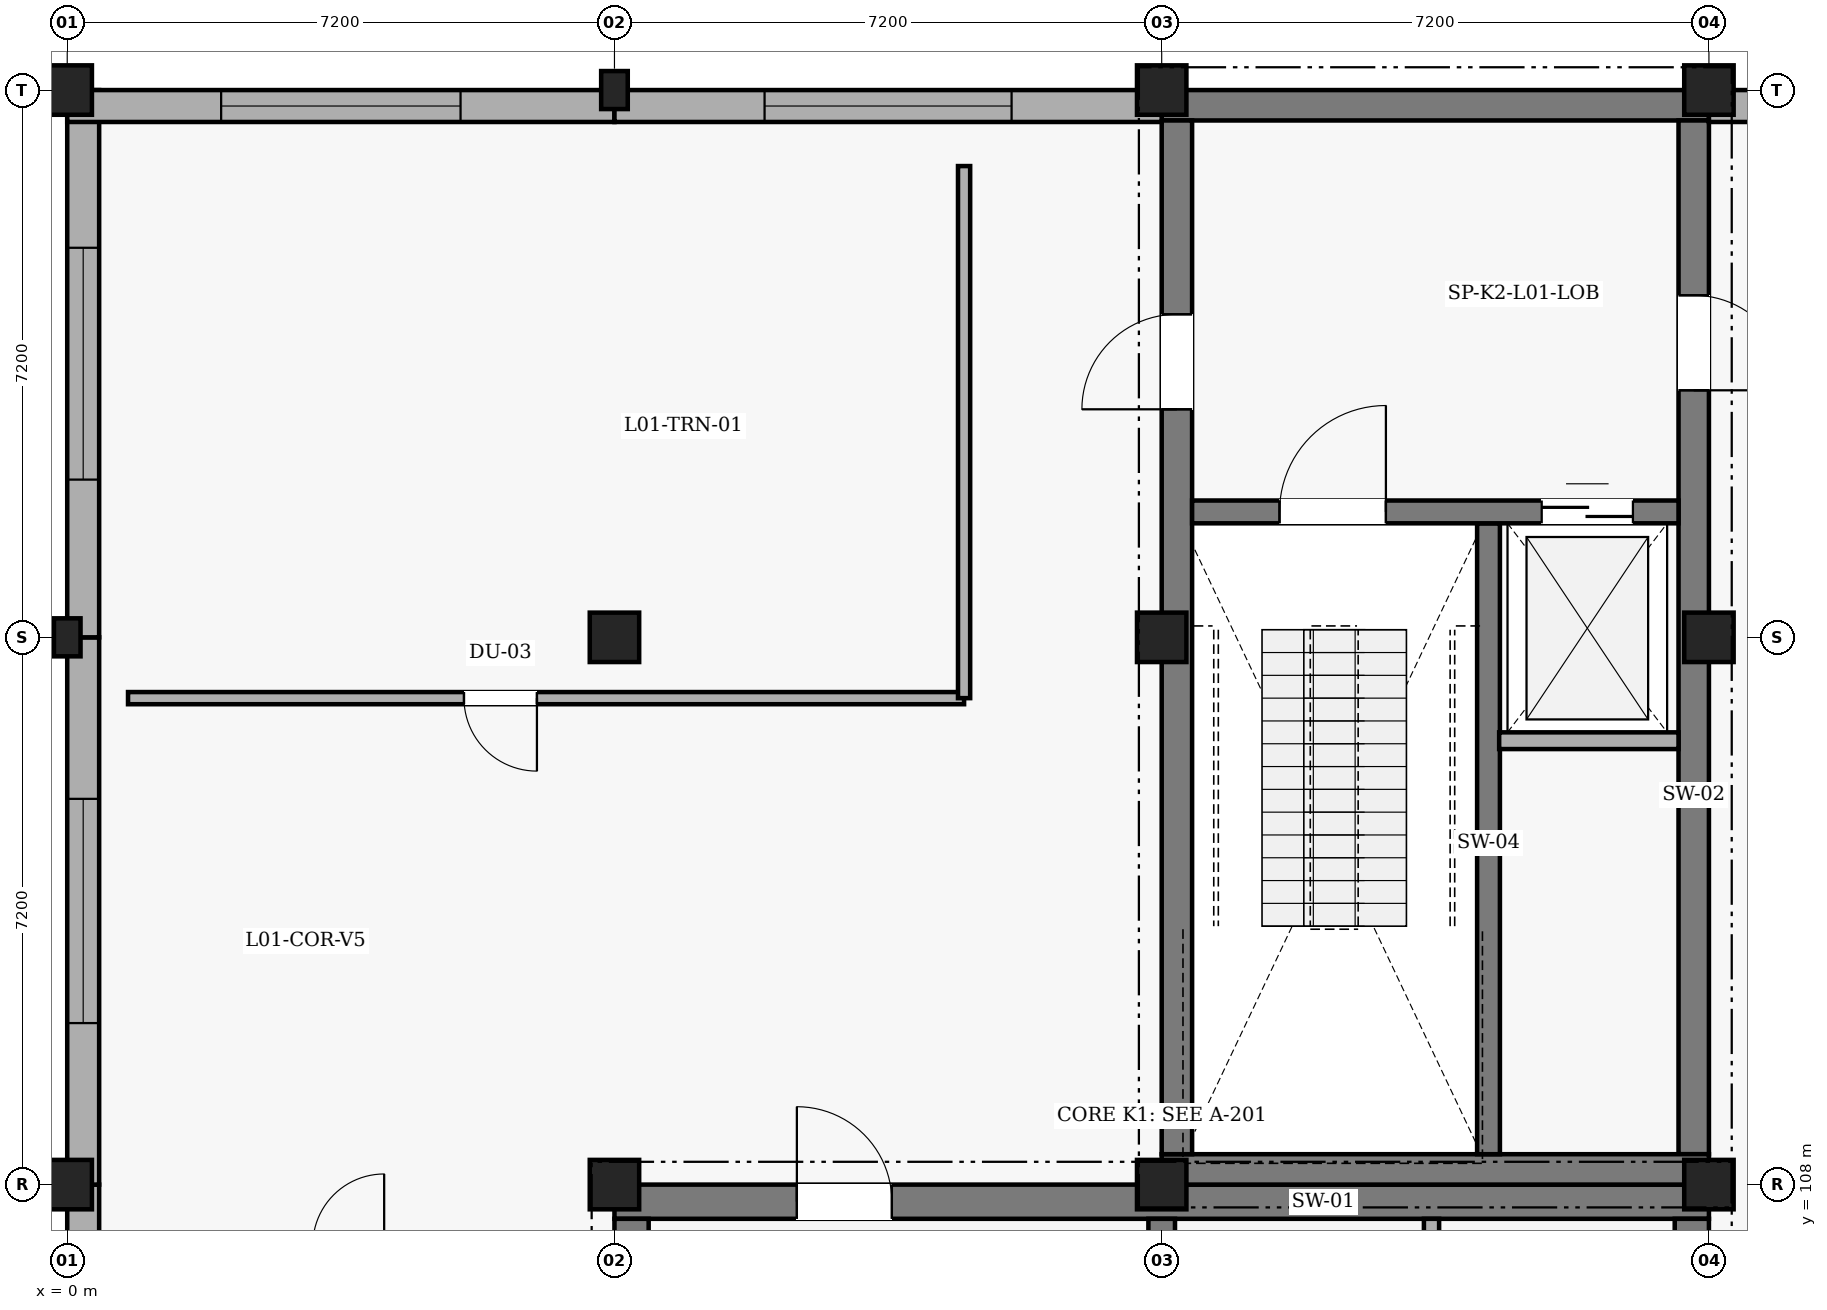
"""IFC4 building model, lengths in metres.
Left out: names, types, materials, properties, quantities, classifications, styles, units other than length and angle.
Written with IfcOpenShell. Run it as: python <this file> out.ifc"""

import sys

from ifc_helpers import new_model, si_unit, direction, frame, frame_2d, origin, origin_2d, place, context, subcontext, project, spatial, rectangle, extrude, element, fill, save


model = new_model("IFC4")
c1 = context("Model", 3, precision=1e-05, world=origin(), true_north=direction((0.0, 1.0)))
c2 = subcontext(c1, "Body", "Model", "MODEL_VIEW")
j1 = project(units=[si_unit("LENGTHUNIT", "METRE"), si_unit("PLANEANGLEUNIT", "RADIAN")], contexts=[c1])
p1 = place(None, origin())
s1 = spatial("IfcSite", under=j1, at=p1, CompositionType="ELEMENT")
p2 = place(p1, origin())
s2 = spatial("IfcBuilding", under=s1, at=p2, CompositionType="ELEMENT")
p3 = place(p2, frame((0.0, 0.0, 5.4)))
s3 = spatial("IfcBuildingStorey", under=s2, at=p3, CompositionType="ELEMENT", Elevation=5.4)
p4 = place(p3, frame((7.2, 107.775, 0.0), z_axis=(0.0, 0.0, 1.0), x_axis=(1.0, 0.0, 0.0)))
e1 = element("IfcWall", 1, at=p4, inside=s3, PredefinedType="SHEAR", context=c2, shape_type="SweptSolid", body=[
    extrude(rectangle(XDim=14.4, YDim=0.45, at=frame_2d((7.2, 0.0))), origin(), (0.0, 0.0, 1.0), 4.2),
])
p5 = place(p4, frame((2.4, 0.0, 0.0)))
e2 = element("IfcOpeningElement", 2, at=p5, cuts=e1, PredefinedType="OPENING", context=c2, shape_type="SweptSolid", body=[
    extrude(rectangle(XDim=1.25, YDim=2.2, at=frame_2d((0.625, 1.1))), frame((0.0, 0.235, 0.0), z_axis=(0.0, -1.0, 0.0), x_axis=(1.0, 0.0, 0.0)), (0.0, 0.0, 1.0), 0.47),
])
p6 = place(p3, frame((21.375, 107.55, 0.0), z_axis=(0.0, 0.0, 1.0), x_axis=(0.0, -1.0, 0.0)))
e3 = element("IfcWall", 3, at=p6, inside=s3, PredefinedType="SHEAR", context=c2, shape_type="SweptSolid", body=[
    extrude(rectangle(XDim=13.5, YDim=0.45, at=frame_2d((6.75, 0.0))), origin(), (0.0, 0.0, 1.0), 4.2),
])
p7 = place(p6, frame((9.8, 0.0, 0.0)))
e4 = element("IfcOpeningElement", 4, at=p7, cuts=e3, PredefinedType="OPENING", context=c2, shape_type="SweptSolid", body=[
    extrude(rectangle(XDim=1.0, YDim=2.15, at=frame_2d((0.5, 1.075))), frame((0.0, 0.235, 0.0), z_axis=(0.0, -1.0, 0.0), x_axis=(1.0, 0.0, 0.0)), (0.0, 0.0, 1.0), 0.47),
])
p8 = place(p6, frame((2.3, 0.0, 0.0)))
e5 = element("IfcOpeningElement", 5, at=p8, cuts=e3, PredefinedType="OPENING", context=c2, shape_type="SweptSolid", body=[
    extrude(rectangle(XDim=1.25, YDim=2.2, at=frame_2d((0.625, 1.1))), frame((0.0, 0.235, 0.0), z_axis=(0.0, -1.0, 0.0), x_axis=(1.0, 0.0, 0.0)), (0.0, 0.0, 1.0), 0.47),
])
p9 = place(p3, frame((7.425, 94.05, 0.0), z_axis=(0.0, 0.0, 1.0), x_axis=(0.0, 1.0, 0.0)))
e6 = element("IfcWall", 6, at=p9, inside=s3, PredefinedType="SHEAR", context=c2, shape_type="SweptSolid", body=[
    extrude(rectangle(XDim=13.5, YDim=0.45, at=frame_2d((6.75, 0.0))), origin(), (0.0, 0.0, 1.0), 4.2),
])
p10 = place(p3, frame((14.4, 107.55, 0.0), z_axis=(0.0, 0.0, 1.0), x_axis=(0.0, -1.0, 0.0)))
e7 = element("IfcWall", 7, at=p10, inside=s3, PredefinedType="SHEAR", context=c2, shape_type="SweptSolid", body=[
    extrude(rectangle(XDim=13.5, YDim=0.35, at=frame_2d((6.75, 0.0))), origin(), (0.0, 0.0, 1.0), 4.2),
])
p11 = place(p10, frame((1.4, 0.0, 0.0)))
e8 = element("IfcOpeningElement", 8, at=p11, cuts=e7, PredefinedType="OPENING", context=c2, shape_type="SweptSolid", body=[
    extrude(rectangle(XDim=1.25, YDim=2.2, at=frame_2d((0.625, 1.1))), frame((0.0, 0.185, 0.0), z_axis=(0.0, -1.0, 0.0), x_axis=(1.0, 0.0, 0.0)), (0.0, 0.0, 1.0), 0.37),
])
p12 = place(p3, frame((14.4, 122.2, 0.0), z_axis=(0.0, 0.0, 1.0), x_axis=(1.0, 0.0, 0.0)))
e9 = element("IfcWall", 9, at=p12, inside=s3, PredefinedType="SHEAR", context=c2, shape_type="SweptSolid", body=[
    extrude(rectangle(XDim=7.2, YDim=0.4, at=frame_2d((3.6, 0.0))), origin(), (0.0, 0.0, 1.0), 4.2),
])
p13 = place(p3, frame((21.4, 122.0, 0.0), z_axis=(0.0, 0.0, 1.0), x_axis=(0.0, -1.0, 0.0)))
e10 = element("IfcWall", 10, at=p13, inside=s3, PredefinedType="SHEAR", context=c2, shape_type="SweptSolid", body=[
    extrude(rectangle(XDim=13.6, YDim=0.4, at=frame_2d((6.8, 0.0))), origin(), (0.0, 0.0, 1.0), 4.2),
])
p14 = place(p13, frame((2.3, 0.0, 0.0)))
e11 = element("IfcOpeningElement", 11, at=p14, cuts=e10, PredefinedType="OPENING", context=c2, shape_type="SweptSolid", body=[
    extrude(rectangle(XDim=1.25, YDim=2.2, at=frame_2d((0.625, 1.1))), frame((0.0, 0.21, 0.0), z_axis=(0.0, -1.0, 0.0), x_axis=(1.0, 0.0, 0.0)), (0.0, 0.0, 1.0), 0.42),
])
p15 = place(p3, frame((21.6, 108.2, 0.0), z_axis=(0.0, 0.0, 1.0), x_axis=(-1.0, 0.0, 0.0)))
e12 = element("IfcWall", 12, at=p15, inside=s3, PredefinedType="SHEAR", context=c2, shape_type="SweptSolid", body=[
    extrude(rectangle(XDim=7.2, YDim=0.4, at=frame_2d((3.6, 0.0))), origin(), (0.0, 0.0, 1.0), 4.2),
])
p16 = place(p3, frame((14.6, 108.4, 0.0), z_axis=(0.0, 0.0, 1.0), x_axis=(0.0, 1.0, 0.0)))
e13 = element("IfcWall", 13, at=p16, inside=s3, PredefinedType="SHEAR", context=c2, shape_type="SweptSolid", body=[
    extrude(rectangle(XDim=13.6, YDim=0.4, at=frame_2d((6.8, 0.0))), origin(), (0.0, 0.0, 1.0), 4.2),
])
p17 = place(p16, frame((9.8, 0.0, 0.0)))
e14 = element("IfcOpeningElement", 14, at=p17, cuts=e13, PredefinedType="OPENING", context=c2, shape_type="SweptSolid", body=[
    extrude(rectangle(XDim=1.25, YDim=2.2, at=frame_2d((0.625, 1.1))), frame((0.0, 0.21, 0.0), z_axis=(0.0, -1.0, 0.0), x_axis=(1.0, 0.0, 0.0)), (0.0, 0.0, 1.0), 0.42),
])
p18 = place(p3, frame((18.7, 116.7, 0.0), z_axis=(0.0, 0.0, 1.0), x_axis=(0.0, -1.0, 0.0)))
e15 = element("IfcWall", 15, at=p18, inside=s3, PredefinedType="SHEAR", context=c2, shape_type="SweptSolid", body=[
    extrude(rectangle(XDim=8.3, YDim=0.3, at=frame_2d((4.15, 0.0))), origin(), (0.0, 0.0, 1.0), 4.2),
])
p19 = place(p3, frame((14.8, 116.85, 0.0), z_axis=(0.0, 0.0, 1.0), x_axis=(1.0, 0.0, 0.0)))
e16 = element("IfcWall", 16, at=p19, inside=s3, PredefinedType="SHEAR", context=c2, shape_type="SweptSolid", body=[
    extrude(rectangle(XDim=6.4, YDim=0.3, at=frame_2d((3.2, 0.0))), origin(), (0.0, 0.0, 1.0), 4.2),
])
p20 = place(p19, frame((1.15, 0.0, 0.0)))
e17 = element("IfcOpeningElement", 17, at=p20, cuts=e16, PredefinedType="OPENING", context=c2, shape_type="SweptSolid", body=[
    extrude(rectangle(XDim=1.4, YDim=2.2, at=frame_2d((0.7, 1.1))), frame((0.0, 0.16, 0.0), z_axis=(0.0, -1.0, 0.0), x_axis=(1.0, 0.0, 0.0)), (0.0, 0.0, 1.0), 0.32),
])
p21 = place(p19, frame((4.6, 0.0, 0.0)))
e18 = element("IfcOpeningElement", 18, at=p21, cuts=e16, PredefinedType="OPENING", context=c2, shape_type="SweptSolid", body=[
    extrude(rectangle(XDim=1.2, YDim=2.15, at=frame_2d((0.6, 1.075))), frame((0.0, 0.16, 0.0), z_axis=(0.0, -1.0, 0.0), x_axis=(1.0, 0.0, 0.0)), (0.0, 0.0, 1.0), 0.32),
])
p22 = place(p3, frame((0.0, 108.0, 0.0), z_axis=(0.0, 0.0, 1.0), x_axis=(1.0, 0.0, 0.0)))
e19 = element("IfcColumn", 19, at=p22, inside=s3, PredefinedType="COLUMN", context=c2, shape_type="SweptSolid", body=[
    extrude(rectangle(XDim=0.65, YDim=0.65, at=origin_2d()), origin(), (0.0, 0.0, 1.0), 3.88),
])
p23 = place(p3, frame((0.0, 115.2, 0.0), z_axis=(0.0, 0.0, 1.0), x_axis=(1.0, 0.0, 0.0)))
e20 = element("IfcColumn", 20, at=p23, inside=s3, PredefinedType="PILASTER", context=c2, shape_type="SweptSolid", body=[
    extrude(rectangle(XDim=0.35, YDim=0.5, at=origin_2d()), origin(), (0.0, 0.0, 1.0), 3.88),
])
for number, where, z_axis, x_axis in (
    (21, (0.0, 122.4, 0.0), (0.0, 0.0, 1.0), (1.0, 0.0, 0.0)),
    (22, (7.2, 108.0, 0.0), (0.0, 0.0, 1.0), (1.0, 0.0, 0.0)),
    (23, (7.2, 115.2, 0.0), (0.0, 0.0, 1.0), (1.0, 0.0, 0.0)),
):
    element("IfcColumn", number, at=place(p3, frame(where, z_axis=z_axis, x_axis=x_axis)), inside=s3, PredefinedType="COLUMN", context=c2, shape_type="SweptSolid", body=[
        extrude(rectangle(XDim=0.65, YDim=0.65, at=origin_2d()), origin(), (0.0, 0.0, 1.0), 3.88),
    ])
p24 = place(p3, frame((7.2, 122.4, 0.0), z_axis=(0.0, 0.0, 1.0), x_axis=(1.0, 0.0, 0.0)))
e24 = element("IfcColumn", 24, at=p24, inside=s3, PredefinedType="PILASTER", context=c2, shape_type="SweptSolid", body=[
    extrude(rectangle(XDim=0.35, YDim=0.5, at=origin_2d()), origin(), (0.0, 0.0, 1.0), 3.88),
])
for number, where, z_axis, x_axis in (
    (25, (14.4, 108.0, 0.0), (0.0, 0.0, 1.0), (1.0, 0.0, 0.0)),
    (26, (14.4, 115.2, 0.0), (0.0, 0.0, 1.0), (1.0, 0.0, 0.0)),
    (27, (14.4, 122.4, 0.0), (0.0, 0.0, 1.0), (1.0, 0.0, 0.0)),
    (28, (21.6, 108.0, 0.0), (0.0, 0.0, 1.0), (1.0, 0.0, 0.0)),
    (29, (21.6, 115.2, 0.0), (0.0, 0.0, 1.0), (1.0, 0.0, 0.0)),
    (30, (21.6, 122.4, 0.0), (0.0, 0.0, 1.0), (1.0, 0.0, 0.0)),
):
    element("IfcColumn", number, at=place(p3, frame(where, z_axis=z_axis, x_axis=x_axis)), inside=s3, PredefinedType="COLUMN", context=c2, shape_type="SweptSolid", body=[
        extrude(rectangle(XDim=0.65, YDim=0.65, at=origin_2d()), origin(), (0.0, 0.0, 1.0), 3.88),
    ])
p25 = place(p3, frame((0.21, 100.8, 0.0), z_axis=(0.0, 0.0, 1.0), x_axis=(0.0, 1.0, 0.0)))
e31 = element("IfcWall", 31, at=p25, inside=s3, PredefinedType="SOLIDWALL", context=c2, shape_type="SweptSolid", body=[
    extrude(rectangle(XDim=7.2, YDim=0.42, at=frame_2d((3.6, 0.0))), origin(), (0.0, 0.0, 1.0), 3.55),
])
p26 = place(p25, frame((2.175, 0.0, 0.9)))
e32 = element("IfcOpeningElement", 32, at=p26, cuts=e31, PredefinedType="OPENING", context=c2, shape_type="SweptSolid", body=[
    extrude(rectangle(XDim=2.85, YDim=1.55, at=frame_2d((1.425, 0.775))), frame((0.0, 0.22, 0.0), z_axis=(0.0, -1.0, 0.0), x_axis=(1.0, 0.0, 0.0)), (0.0, 0.0, 1.0), 0.44),
])
p27 = place(p3, frame((0.21, 108.0, 0.0), z_axis=(0.0, 0.0, 1.0), x_axis=(0.0, 1.0, 0.0)))
e33 = element("IfcWall", 33, at=p27, inside=s3, PredefinedType="SOLIDWALL", context=c2, shape_type="SweptSolid", body=[
    extrude(rectangle(XDim=7.2, YDim=0.42, at=frame_2d((3.6, 0.0))), origin(), (0.0, 0.0, 1.0), 3.55),
])
p28 = place(p27, frame((2.125, 0.0, 0.9)))
e34 = element("IfcOpeningElement", 34, at=p28, cuts=e33, PredefinedType="OPENING", context=c2, shape_type="SweptSolid", body=[
    extrude(rectangle(XDim=2.95, YDim=1.6, at=frame_2d((1.475, 0.8))), frame((0.0, 0.22, 0.0), z_axis=(0.0, -1.0, 0.0), x_axis=(1.0, 0.0, 0.0)), (0.0, 0.0, 1.0), 0.44),
])
p29 = place(p3, frame((0.21, 115.2, 0.0), z_axis=(0.0, 0.0, 1.0), x_axis=(0.0, 1.0, 0.0)))
e35 = element("IfcWall", 35, at=p29, inside=s3, PredefinedType="SOLIDWALL", context=c2, shape_type="SweptSolid", body=[
    extrude(rectangle(XDim=7.2, YDim=0.42, at=frame_2d((3.6, 0.0))), origin(), (0.0, 0.0, 1.0), 3.55),
])
p30 = place(p29, frame((2.075, 0.0, 0.9)))
e36 = element("IfcOpeningElement", 36, at=p30, cuts=e35, PredefinedType="OPENING", context=c2, shape_type="SweptSolid", body=[
    extrude(rectangle(XDim=3.05, YDim=1.65, at=frame_2d((1.525, 0.825))), frame((0.0, 0.22, 0.0), z_axis=(0.0, -1.0, 0.0), x_axis=(1.0, 0.0, 0.0)), (0.0, 0.0, 1.0), 0.44),
])
p31 = place(p3, frame((0.0, 122.19, 0.0), z_axis=(0.0, 0.0, 1.0), x_axis=(1.0, 0.0, 0.0)))
e37 = element("IfcWall", 37, at=p31, inside=s3, PredefinedType="SOLIDWALL", context=c2, shape_type="SweptSolid", body=[
    extrude(rectangle(XDim=7.2, YDim=0.42, at=frame_2d((3.6, 0.0))), origin(), (0.0, 0.0, 1.0), 3.58),
])
p32 = place(p31, frame((2.025, 0.0, 0.9)))
e38 = element("IfcOpeningElement", 38, at=p32, cuts=e37, PredefinedType="OPENING", context=c2, shape_type="SweptSolid", body=[
    extrude(rectangle(XDim=3.15, YDim=1.7, at=frame_2d((1.575, 0.85))), frame((0.0, 0.22, 0.0), z_axis=(0.0, -1.0, 0.0), x_axis=(1.0, 0.0, 0.0)), (0.0, 0.0, 1.0), 0.44),
])
p33 = place(p3, frame((7.2, 122.19, 0.0), z_axis=(0.0, 0.0, 1.0), x_axis=(1.0, 0.0, 0.0)))
e39 = element("IfcWall", 39, at=p33, inside=s3, PredefinedType="SOLIDWALL", context=c2, shape_type="SweptSolid", body=[
    extrude(rectangle(XDim=7.2, YDim=0.42, at=frame_2d((3.6, 0.0))), origin(), (0.0, 0.0, 1.0), 3.58),
])
p34 = place(p33, frame((1.975, 0.0, 0.9)))
e40 = element("IfcOpeningElement", 40, at=p34, cuts=e39, PredefinedType="OPENING", context=c2, shape_type="SweptSolid", body=[
    extrude(rectangle(XDim=3.25, YDim=1.75, at=frame_2d((1.625, 0.875))), frame((0.0, 0.22, 0.0), z_axis=(0.0, -1.0, 0.0), x_axis=(1.0, 0.0, 0.0)), (0.0, 0.0, 1.0), 0.44),
])
p35 = place(p3, frame((21.6, 122.19, 0.0), z_axis=(0.0, 0.0, 1.0), x_axis=(1.0, 0.0, 0.0)))
e41 = element("IfcWall", 41, at=p35, inside=s3, PredefinedType="SOLIDWALL", context=c2, shape_type="SweptSolid", body=[
    extrude(rectangle(XDim=7.2, YDim=0.42, at=frame_2d((3.6, 0.0))), origin(), (0.0, 0.0, 1.0), 3.58),
])
p36 = place(p35, frame((1.925, 0.0, 0.9)))
e42 = element("IfcOpeningElement", 42, at=p36, cuts=e41, PredefinedType="OPENING", context=c2, shape_type="SweptSolid", body=[
    extrude(rectangle(XDim=3.35, YDim=1.8, at=frame_2d((1.675, 0.9))), frame((0.0, 0.22, 0.0), z_axis=(0.0, -1.0, 0.0), x_axis=(1.0, 0.0, 0.0)), (0.0, 0.0, 1.0), 0.44),
])
p37 = place(p3, frame((17.95, 102.56, 0.0), z_axis=(0.0, 0.0, 1.0), x_axis=(0.0, 1.0, 0.0)))
e43 = element("IfcWall", 43, at=p37, inside=s3, PredefinedType="PARTITIONING", context=c2, shape_type="SweptSolid", body=[
    extrude(rectangle(XDim=4.99, YDim=0.2, at=frame_2d((2.495, 0.0))), origin(), (0.0, 0.0, 1.0), 3.85),
])
p38 = place(p37, frame((1.6, 0.0, 0.0)))
e44 = element("IfcOpeningElement", 44, at=p38, cuts=e43, PredefinedType="OPENING", context=c2, shape_type="SweptSolid", body=[
    extrude(rectangle(XDim=1.25, YDim=2.2, at=frame_2d((0.625, 1.1))), frame((0.0, 0.11, 0.0), z_axis=(0.0, -1.0, 0.0), x_axis=(1.0, 0.0, 0.0)), (0.0, 0.0, 1.0), 0.22),
])
p39 = place(p3, frame((18.84, 113.84, 0.0), z_axis=(0.0, 0.0, 1.0), x_axis=(1.0, 0.0, 0.0)))
e45 = element("IfcWall", 45, at=p39, inside=s3, PredefinedType="PARTITIONING", context=c2, shape_type="SweptSolid", body=[
    extrude(rectangle(XDim=2.36, YDim=0.22, at=frame_2d((1.18, 0.0))), origin(), (0.0, 0.0, 1.0), 3.85),
])
p40 = place(p3, frame((11.8, 114.4, 0.0), z_axis=(0.0, 0.0, 1.0), x_axis=(-1.0, 0.0, 0.0)))
e46 = element("IfcWall", 46, at=p40, inside=s3, PredefinedType="PARTITIONING", context=c2, shape_type="SweptSolid", body=[
    extrude(rectangle(XDim=11.0, YDim=0.16, at=frame_2d((5.5, 0.0))), origin(), (0.0, 0.0, 1.0), 3.43),
])
p41 = place(p40, frame((5.62, 0.0, 0.0)))
e47 = element("IfcOpeningElement", 47, at=p41, cuts=e46, PredefinedType="OPENING", context=c2, shape_type="SweptSolid", body=[
    extrude(rectangle(XDim=0.96, YDim=2.12, at=frame_2d((0.48, 1.06))), frame((0.0, 0.09, 0.0), z_axis=(0.0, -1.0, 0.0), x_axis=(1.0, 0.0, 0.0)), (0.0, 0.0, 1.0), 0.18),
])
p42 = place(p3, frame((11.8, 121.4, 0.0), z_axis=(0.0, 0.0, 1.0), x_axis=(0.0, -1.0, 0.0)))
e48 = element("IfcWall", 48, at=p42, inside=s3, PredefinedType="PARTITIONING", context=c2, shape_type="SweptSolid", body=[
    extrude(rectangle(XDim=7.0, YDim=0.16, at=frame_2d((3.5, 0.0))), origin(), (0.0, 0.0, 1.0), 3.43),
])
p43 = place(p28, origin())
e49 = element("IfcWindow", 49, at=p43, inside=s3, PartitioningType="SINGLE_PANEL", PredefinedType="WINDOW", context=c2, shape_type="SweptSolid", body=[
    extrude(rectangle(XDim=2.95, YDim=1.6, at=frame_2d((1.475, 0.8))), frame((0.0, 0.03, 0.0), z_axis=(0.0, -1.0, 0.0), x_axis=(1.0, 0.0, 0.0)), (0.0, 0.0, 1.0), 0.06),
])
fill(e34, e49)
p44 = place(p30, origin())
e50 = element("IfcWindow", 50, at=p44, inside=s3, PartitioningType="SINGLE_PANEL", PredefinedType="WINDOW", context=c2, shape_type="SweptSolid", body=[
    extrude(rectangle(XDim=3.05, YDim=1.65, at=frame_2d((1.525, 0.825))), frame((0.0, 0.03, 0.0), z_axis=(0.0, -1.0, 0.0), x_axis=(1.0, 0.0, 0.0)), (0.0, 0.0, 1.0), 0.06),
])
fill(e36, e50)
p45 = place(p32, origin())
e51 = element("IfcWindow", 51, at=p45, inside=s3, PartitioningType="SINGLE_PANEL", PredefinedType="WINDOW", context=c2, shape_type="SweptSolid", body=[
    extrude(rectangle(XDim=3.15, YDim=1.7, at=frame_2d((1.575, 0.85))), frame((0.0, 0.03, 0.0), z_axis=(0.0, -1.0, 0.0), x_axis=(1.0, 0.0, 0.0)), (0.0, 0.0, 1.0), 0.06),
])
fill(e38, e51)
p46 = place(p34, origin())
e52 = element("IfcWindow", 52, at=p46, inside=s3, PartitioningType="SINGLE_PANEL", PredefinedType="WINDOW", context=c2, shape_type="SweptSolid", body=[
    extrude(rectangle(XDim=3.25, YDim=1.75, at=frame_2d((1.625, 0.875))), frame((0.0, 0.03, 0.0), z_axis=(0.0, -1.0, 0.0), x_axis=(1.0, 0.0, 0.0)), (0.0, 0.0, 1.0), 0.06),
])
fill(e40, e52)
p47 = place(p5, origin())
e53 = element("IfcDoor", 53, at=p47, inside=s3, OperationType="SINGLE_SWING_LEFT", PredefinedType="DOOR", context=c2, shape_type="SweptSolid", body=[
    extrude(rectangle(XDim=1.25, YDim=2.2, at=frame_2d((0.625, 1.1))), frame((0.0, 0.025, 0.0), z_axis=(0.0, -1.0, 0.0), x_axis=(1.0, 0.0, 0.0)), (0.0, 0.0, 1.0), 0.05),
])
fill(e2, e53)
p48 = place(p20, origin())
e54 = element("IfcDoor", 54, at=p48, inside=s3, OperationType="SINGLE_SWING_RIGHT", PredefinedType="DOOR", context=c2, shape_type="SweptSolid", body=[
    extrude(rectangle(XDim=1.4, YDim=2.2, at=frame_2d((0.7, 1.1))), frame((0.0, 0.025, 0.0), z_axis=(0.0, -1.0, 0.0), x_axis=(1.0, 0.0, 0.0)), (0.0, 0.0, 1.0), 0.05),
])
fill(e17, e54)
p49 = place(p21, origin())
e55 = element("IfcDoor", 55, at=p49, inside=s3, OperationType="DOUBLE_DOOR_SLIDING", PredefinedType="DOOR", context=c2, shape_type="SweptSolid", body=[
    extrude(rectangle(XDim=1.2, YDim=2.15, at=frame_2d((0.6, 1.075))), frame((0.0, 0.025, 0.0), z_axis=(0.0, -1.0, 0.0), x_axis=(1.0, 0.0, 0.0)), (0.0, 0.0, 1.0), 0.05),
])
fill(e18, e55)
p50 = place(p17, origin())
e56 = element("IfcDoor", 56, at=p50, inside=s3, OperationType="SINGLE_SWING_LEFT", PredefinedType="DOOR", context=c2, shape_type="SweptSolid", body=[
    extrude(rectangle(XDim=1.25, YDim=2.2, at=frame_2d((0.625, 1.1))), frame((0.0, 0.025, 0.0), z_axis=(0.0, -1.0, 0.0), x_axis=(1.0, 0.0, 0.0)), (0.0, 0.0, 1.0), 0.05),
])
fill(e14, e56)
p51 = place(p14, origin())
e57 = element("IfcDoor", 57, at=p51, inside=s3, OperationType="SINGLE_SWING_RIGHT", PredefinedType="DOOR", context=c2, shape_type="SweptSolid", body=[
    extrude(rectangle(XDim=1.25, YDim=2.2, at=frame_2d((0.625, 1.1))), frame((0.0, 0.025, 0.0), z_axis=(0.0, -1.0, 0.0), x_axis=(1.0, 0.0, 0.0)), (0.0, 0.0, 1.0), 0.05),
])
fill(e11, e57)
p52 = place(p41, origin())
e58 = element("IfcDoor", 58, at=p52, inside=s3, OperationType="SINGLE_SWING_LEFT", PredefinedType="DOOR", context=c2, shape_type="SweptSolid", body=[
    extrude(rectangle(XDim=0.96, YDim=2.12, at=frame_2d((0.48, 1.06))), frame((0.0, 0.025, 0.0), z_axis=(0.0, -1.0, 0.0), x_axis=(1.0, 0.0, 0.0)), (0.0, 0.0, 1.0), 0.05),
])
fill(e47, e58)
save(model, sys.argv[1])
